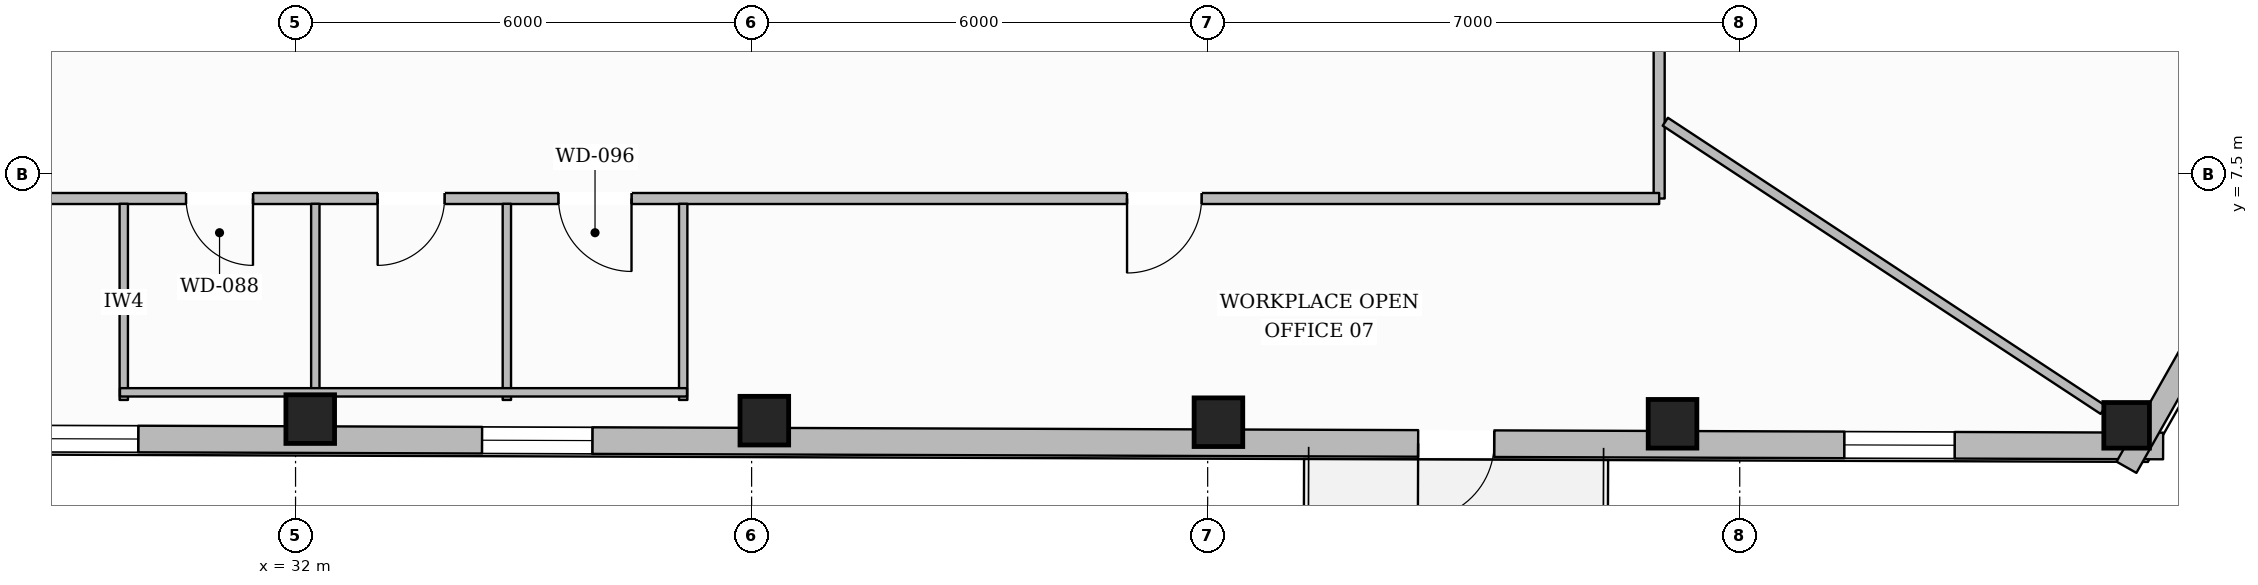
"""IFC4 building model, lengths in metres.
Left out: names, types, materials, properties, quantities, classifications, styles, units other than length and angle.
Written with IfcOpenShell. Run it as: python <this file> out.ifc"""

import sys

from ifc_helpers import new_model, si_unit, direction, frame, frame_2d, origin, origin_2d, place, context, subcontext, project, spatial, rectangle, hollow_rectangle, extrude, element, fill, save


model = new_model("IFC4")
c1 = context("Model", 3, precision=1e-05, world=origin(), true_north=direction((0.0, 1.0)))
c2 = subcontext(c1, "Body", "Model", "MODEL_VIEW")
j1 = project(units=[si_unit("LENGTHUNIT", "METRE"), si_unit("PLANEANGLEUNIT", "RADIAN")], contexts=[c1])
p1 = place(None, origin())
s1 = spatial("IfcSite", under=j1, at=p1, CompositionType="ELEMENT")
p2 = place(p1, origin())
s2 = spatial("IfcBuilding", under=s1, at=p2, CompositionType="ELEMENT")
p3 = place(p2, frame((0.0, 0.0, 168.85)))
s3 = spatial("IfcBuildingStorey", under=s2, at=p3, CompositionType="ELEMENT", Elevation=168.85)
for number, where, z_axis, x_axis in (
    (1, (32.193, 4.278, 0.0), (0.0, 0.0, 1.0), (1.0, 0.0, 0.0)),
    (2, (38.167, 4.257, 0.0), (0.0, 0.0, 1.0), (1.0, 0.0, 0.0)),
    (3, (44.142, 4.237, 0.0), (0.0, 0.0, 1.0), (1.0, 0.0, 0.0)),
    (4, (50.116, 4.216, 0.0), (0.0, 0.0, 1.0), (1.0, 0.0, 0.0)),
):
    element("IfcColumn", number, at=place(p3, frame(where, z_axis=z_axis, x_axis=x_axis)), inside=s3, PredefinedType="COLUMN", context=c2, shape_type="SweptSolid", body=[
        extrude(hollow_rectangle(XDim=0.64, YDim=0.64, WallThickness=0.028, at=origin_2d()), origin(), (0.0, 0.0, 1.0), 3.6),
    ])
p4 = place(p3, frame((56.09, 4.196, 0.0), z_axis=(0.0, 0.0, 1.0), x_axis=(1.0, 0.0, 0.0)))
e5 = element("IfcColumn", 5, at=p4, inside=s3, PredefinedType="COLUMN", context=c2, shape_type="SweptSolid", body=[
    extrude(hollow_rectangle(XDim=0.6, YDim=0.6, WallThickness=0.028, at=origin_2d()), origin(), (0.0, 0.0, 1.0), 3.6),
])
p5 = place(p3, frame((56.57, 3.924, 0.0), z_axis=(0.0, 0.0, 1.0), x_axis=(-0.999994073586, 0.003442788504, 0.0)))
e6 = element("IfcWall", 6, at=p5, inside=s3, PredefinedType="STANDARD", context=c2, shape_type="SweptSolid", body=[
    extrude(rectangle(XDim=36.804, YDim=0.35, at=frame_2d((18.402, 0.0))), origin(), (0.0, 0.0, 1.0), 3.132),
])
p6 = place(p5, frame((8.801, 0.0, 0.0)))
e7 = element("IfcOpeningElement", 7, at=p6, cuts=e6, PredefinedType="OPENING", context=c2, shape_type="SweptSolid", body=[
    extrude(rectangle(XDim=1.0, YDim=2.2, at=frame_2d((0.5, 1.1))), frame((0.0, 0.185, 0.0), z_axis=(0.0, -1.0, 0.0), x_axis=(1.0, 0.0, 0.0)), (0.0, 0.0, 1.0), 0.37),
])
p7 = place(p5, frame((32.614, 0.0, 0.65)))
e8 = element("IfcOpeningElement", 8, at=p7, cuts=e6, PredefinedType="OPENING", context=c2, shape_type="SweptSolid", body=[
    extrude(rectangle(XDim=1.45, YDim=1.75, at=frame_2d((0.725, 0.875))), frame((0.0, 0.185, 0.0), z_axis=(0.0, -1.0, 0.0), x_axis=(1.0, 0.0, 0.0)), (0.0, 0.0, 1.0), 0.37),
])
p8 = place(p5, frame((26.64, 0.0, 0.65)))
e9 = element("IfcOpeningElement", 9, at=p8, cuts=e6, PredefinedType="OPENING", context=c2, shape_type="SweptSolid", body=[
    extrude(rectangle(XDim=1.45, YDim=1.75, at=frame_2d((0.725, 0.875))), frame((0.0, 0.185, 0.0), z_axis=(0.0, -1.0, 0.0), x_axis=(1.0, 0.0, 0.0)), (0.0, 0.0, 1.0), 0.37),
])
p9 = place(p5, frame((20.666, 0.0, 0.65)))
e10 = element("IfcOpeningElement", 10, at=p9, cuts=e6, PredefinedType="OPENING", context=c2, shape_type="SweptSolid", body=[
    extrude(rectangle(XDim=1.45, YDim=1.75, at=frame_2d((0.725, 0.875))), frame((0.0, 0.185, 0.0), z_axis=(0.0, -1.0, 0.0), x_axis=(1.0, 0.0, 0.0)), (0.0, 0.0, 1.0), 0.37),
])
p10 = place(p5, frame((2.743, 0.0, 0.65)))
e11 = element("IfcOpeningElement", 11, at=p10, cuts=e6, PredefinedType="OPENING", context=c2, shape_type="SweptSolid", body=[
    extrude(rectangle(XDim=1.45, YDim=1.75, at=frame_2d((0.725, 0.875))), frame((0.0, 0.185, 0.0), z_axis=(0.0, -1.0, 0.0), x_axis=(1.0, 0.0, 0.0)), (0.0, 0.0, 1.0), 0.37),
])
p11 = place(p3, frame((61.204, 12.688, 0.0), z_axis=(0.0, 0.0, 1.0), x_axis=(-0.492343697675, -0.870400875091, 0.0)))
e12 = element("IfcWall", 12, at=p11, inside=s3, PredefinedType="STANDARD", context=c2, shape_type="SweptSolid", body=[
    extrude(rectangle(XDim=10.391, YDim=0.3, at=frame_2d((5.195, 0.0))), origin(), (0.0, 0.0, 1.0), 3.132),
])
p12 = place(p11, frame((4.67, 0.0, 0.65)))
e13 = element("IfcOpeningElement", 13, at=p12, cuts=e12, PredefinedType="OPENING", context=c2, shape_type="SweptSolid", body=[
    extrude(rectangle(XDim=1.05, YDim=1.7, at=frame_2d((0.525, 0.85))), frame((0.0, 0.16, 0.0), z_axis=(0.0, -1.0, 0.0), x_axis=(1.0, 0.0, 0.0)), (0.0, 0.0, 1.0), 0.32),
])
p13 = place(p3, frame((49.94, 15.1, 0.0), z_axis=(0.0, 0.0, 1.0), x_axis=(0.0, -1.0, 0.0)))
e14 = element("IfcWall", 14, at=p13, inside=s3, PredefinedType="PARTITIONING", context=c2, shape_type="SweptSolid", body=[
    extrude(rectangle(XDim=7.92, YDim=0.145, at=frame_2d((3.96, 0.0))), origin(), (0.0, 0.0, 1.0), 3.6),
])
p14 = place(p13, frame((2.816, 0.0, 0.0)))
e15 = element("IfcOpeningElement", 15, at=p14, cuts=e14, PredefinedType="OPENING", context=c2, shape_type="SweptSolid", body=[
    extrude(rectangle(XDim=1.4, YDim=2.2, at=frame_2d((0.7, 1.1))), frame((0.0, 0.083, 0.0), z_axis=(0.0, -1.0, 0.0), x_axis=(1.0, 0.0, 0.0)), (0.0, 0.0, 1.0), 0.165),
])
p15 = place(p3, frame((49.94, 7.18, 0.0), z_axis=(0.0, 0.0, 1.0), x_axis=(-1.0, 0.0, 0.0)))
e16 = element("IfcWall", 16, at=p15, inside=s3, PredefinedType="PARTITIONING", context=c2, shape_type="SweptSolid", body=[
    extrude(rectangle(XDim=23.88, YDim=0.145, at=frame_2d((11.94, 0.0))), origin(), (0.0, 0.0, 1.0), 3.6),
])
p16 = place(p15, frame((18.5, 0.0, 0.0)))
e17 = element("IfcOpeningElement", 17, at=p16, cuts=e16, PredefinedType="OPENING", context=c2, shape_type="SweptSolid", body=[
    extrude(rectangle(XDim=0.88, YDim=2.1, at=frame_2d((0.44, 1.05))), frame((0.0, 0.083, 0.0), z_axis=(0.0, -1.0, 0.0), x_axis=(1.0, 0.0, 0.0)), (0.0, 0.0, 1.0), 0.165),
])
p17 = place(p15, frame((15.98, 0.0, 0.0)))
e18 = element("IfcOpeningElement", 18, at=p17, cuts=e16, PredefinedType="OPENING", context=c2, shape_type="SweptSolid", body=[
    extrude(rectangle(XDim=0.88, YDim=2.1, at=frame_2d((0.44, 1.05))), frame((0.0, 0.083, 0.0), z_axis=(0.0, -1.0, 0.0), x_axis=(1.0, 0.0, 0.0)), (0.0, 0.0, 1.0), 0.165),
])
p18 = place(p15, frame((13.52, 0.0, 0.0)))
e19 = element("IfcOpeningElement", 19, at=p18, cuts=e16, PredefinedType="OPENING", context=c2, shape_type="SweptSolid", body=[
    extrude(rectangle(XDim=0.96, YDim=2.1, at=frame_2d((0.48, 1.05))), frame((0.0, 0.083, 0.0), z_axis=(0.0, -1.0, 0.0), x_axis=(1.0, 0.0, 0.0)), (0.0, 0.0, 1.0), 0.165),
])
p19 = place(p15, frame((6.021, 0.0, 0.0)))
e20 = element("IfcOpeningElement", 20, at=p19, cuts=e16, PredefinedType="OPENING", context=c2, shape_type="SweptSolid", body=[
    extrude(rectangle(XDim=0.98, YDim=2.15, at=frame_2d((0.49, 1.075))), frame((0.0, 0.083, 0.0), z_axis=(0.0, -1.0, 0.0), x_axis=(1.0, 0.0, 0.0)), (0.0, 0.0, 1.0), 0.165),
])
p20 = place(p3, frame((29.74, 4.53, 0.0), z_axis=(0.0, 0.0, 1.0), x_axis=(0.0, 1.0, 0.0)))
e21 = element("IfcWall", 21, at=p20, inside=s3, PredefinedType="PLUMBINGWALL", context=c2, shape_type="SweptSolid", body=[
    extrude(rectangle(XDim=2.58, YDim=0.11, at=frame_2d((1.29, 0.0))), origin(), (0.0, 0.0, 1.0), 3.6),
])
p21 = place(p3, frame((32.26, 4.53, 0.0), z_axis=(0.0, 0.0, 1.0), x_axis=(0.0, 1.0, 0.0)))
e22 = element("IfcWall", 22, at=p21, inside=s3, PredefinedType="PLUMBINGWALL", context=c2, shape_type="SweptSolid", body=[
    extrude(rectangle(XDim=2.58, YDim=0.11, at=frame_2d((1.29, 0.0))), origin(), (0.0, 0.0, 1.0), 3.141),
])
for number, where, z_axis, x_axis in (
    (23, (34.78, 4.53, 0.0), (0.0, 0.0, 1.0), (0.0, 1.0, 0.0)),
    (24, (37.1, 4.53, 0.0), (0.0, 0.0, 1.0), (0.0, 1.0, 0.0)),
):
    element("IfcWall", number, at=place(p3, frame(where, z_axis=z_axis, x_axis=x_axis)), inside=s3, PredefinedType="PLUMBINGWALL", context=c2, shape_type="SweptSolid", body=[
        extrude(rectangle(XDim=2.58, YDim=0.11, at=frame_2d((1.29, 0.0))), origin(), (0.0, 0.0, 1.0), 3.6),
    ])
p22 = place(p3, frame((29.69, 4.63, 0.0), z_axis=(0.0, 0.0, 1.0), x_axis=(1.0, 0.0, 0.0)))
e25 = element("IfcWall", 25, at=p22, inside=s3, PredefinedType="PLUMBINGWALL", context=c2, shape_type="SweptSolid", body=[
    extrude(rectangle(XDim=7.46, YDim=0.11, at=frame_2d((3.73, 0.0))), origin(), (0.0, 0.0, 1.0), 3.6),
])
p23 = place(p3, frame((50.021, 8.19, 0.0), z_axis=(0.0, 0.0, 1.0), x_axis=(0.835346502692, -0.549723767397, 0.0)))
e26 = element("IfcWall", 26, at=p23, inside=s3, PredefinedType="PARTITIONING", context=c2, shape_type="SweptSolid", body=[
    extrude(rectangle(XDim=6.897, YDim=0.125, at=frame_2d((3.449, 0.0))), origin(), (0.0, 0.0, 1.0), 3.141),
])
p24 = place(p6, origin())
e27 = element("IfcDoor", 27, at=p24, inside=s3, OperationType="SINGLE_SWING_RIGHT", PredefinedType="DOOR", context=c2, shape_type="SweptSolid", body=[
    extrude(rectangle(XDim=1.0, YDim=2.2, at=frame_2d((0.5, 1.1))), frame((0.0, 0.025, 0.0), z_axis=(0.0, -1.0, 0.0), x_axis=(1.0, 0.0, 0.0)), (0.0, 0.0, 1.0), 0.05),
])
fill(e7, e27)
p25 = place(p8, origin())
e28 = element("IfcWindow", 28, at=p25, inside=s3, PartitioningType="SINGLE_PANEL", PredefinedType="WINDOW", context=c2, shape_type="SweptSolid", body=[
    extrude(rectangle(XDim=1.45, YDim=1.75, at=frame_2d((0.725, 0.875))), frame((0.0, 0.03, 0.0), z_axis=(0.0, -1.0, 0.0), x_axis=(1.0, 0.0, 0.0)), (0.0, 0.0, 1.0), 0.06),
])
fill(e9, e28)
p26 = place(p9, origin())
e29 = element("IfcWindow", 29, at=p26, inside=s3, PartitioningType="SINGLE_PANEL", PredefinedType="WINDOW", context=c2, shape_type="SweptSolid", body=[
    extrude(rectangle(XDim=1.45, YDim=1.75, at=frame_2d((0.725, 0.875))), frame((0.0, 0.03, 0.0), z_axis=(0.0, -1.0, 0.0), x_axis=(1.0, 0.0, 0.0)), (0.0, 0.0, 1.0), 0.06),
])
fill(e10, e29)
p27 = place(p10, origin())
e30 = element("IfcWindow", 30, at=p27, inside=s3, PartitioningType="SINGLE_PANEL", PredefinedType="WINDOW", context=c2, shape_type="SweptSolid", body=[
    extrude(rectangle(XDim=1.45, YDim=1.75, at=frame_2d((0.725, 0.875))), frame((0.0, 0.03, 0.0), z_axis=(0.0, -1.0, 0.0), x_axis=(1.0, 0.0, 0.0)), (0.0, 0.0, 1.0), 0.06),
])
fill(e11, e30)
p28 = place(p16, origin())
e31 = element("IfcDoor", 31, at=p28, inside=s3, OperationType="SINGLE_SWING_LEFT", PredefinedType="DOOR", context=c2, shape_type="SweptSolid", body=[
    extrude(rectangle(XDim=0.88, YDim=2.1, at=frame_2d((0.44, 1.05))), frame((0.0, 0.025, 0.0), z_axis=(0.0, -1.0, 0.0), x_axis=(1.0, 0.0, 0.0)), (0.0, 0.0, 1.0), 0.05),
])
fill(e17, e31)
p29 = place(p17, origin())
e32 = element("IfcDoor", 32, at=p29, inside=s3, OperationType="SINGLE_SWING_RIGHT", PredefinedType="DOOR", context=c2, shape_type="SweptSolid", body=[
    extrude(rectangle(XDim=0.88, YDim=2.1, at=frame_2d((0.44, 1.05))), frame((0.0, 0.025, 0.0), z_axis=(0.0, -1.0, 0.0), x_axis=(1.0, 0.0, 0.0)), (0.0, 0.0, 1.0), 0.05),
])
fill(e18, e32)
p30 = place(p18, origin())
e33 = element("IfcDoor", 33, at=p30, inside=s3, OperationType="SINGLE_SWING_LEFT", PredefinedType="DOOR", context=c2, shape_type="SweptSolid", body=[
    extrude(rectangle(XDim=0.96, YDim=2.1, at=frame_2d((0.48, 1.05))), frame((0.0, 0.025, 0.0), z_axis=(0.0, -1.0, 0.0), x_axis=(1.0, 0.0, 0.0)), (0.0, 0.0, 1.0), 0.05),
])
fill(e19, e33)
p31 = place(p19, origin())
e34 = element("IfcDoor", 34, at=p31, inside=s3, OperationType="SINGLE_SWING_RIGHT", PredefinedType="DOOR", context=c2, shape_type="SweptSolid", body=[
    extrude(rectangle(XDim=0.98, YDim=2.15, at=frame_2d((0.49, 1.075))), frame((0.0, 0.025, 0.0), z_axis=(0.0, -1.0, 0.0), x_axis=(1.0, 0.0, 0.0)), (0.0, 0.0, 1.0), 0.05),
])
fill(e20, e34)
save(model, sys.argv[1])
